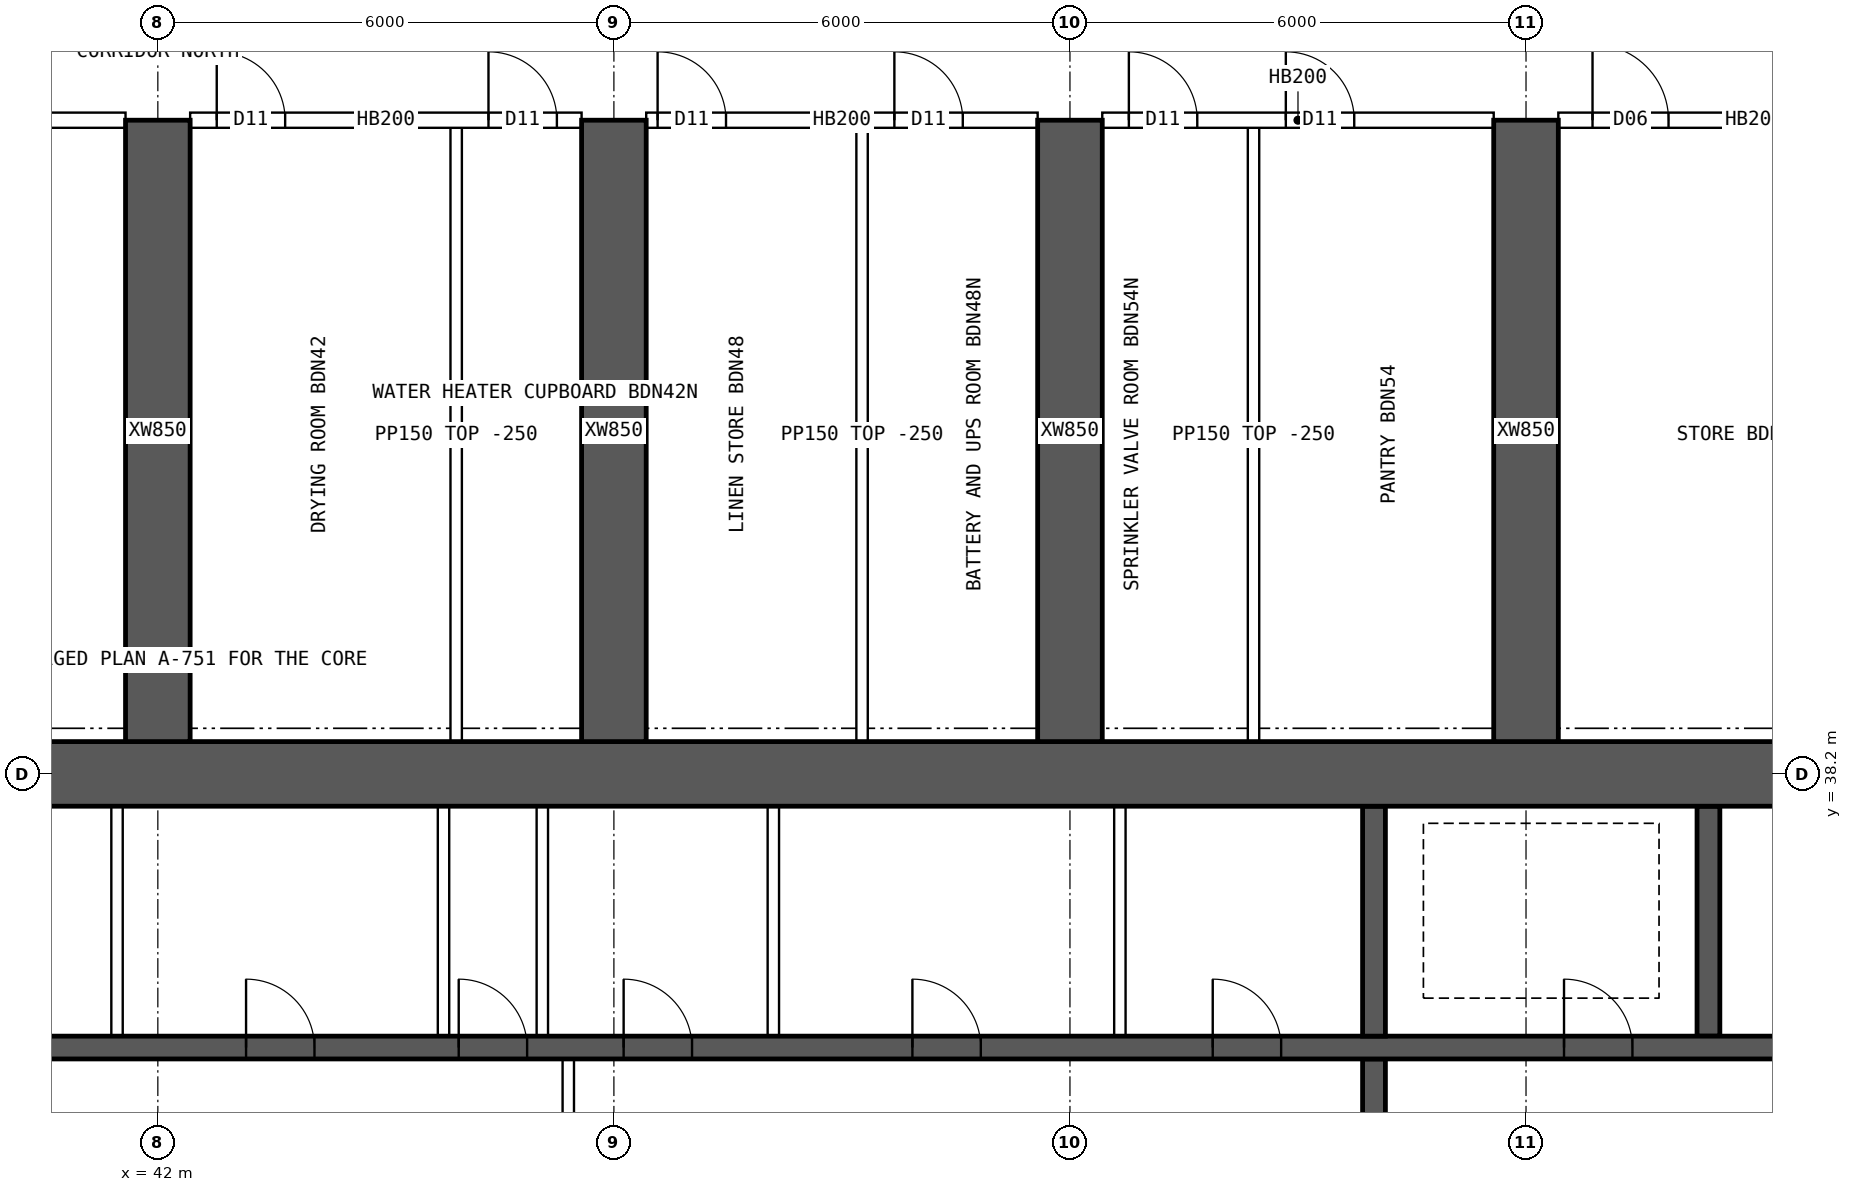
"""IFC4 building model, lengths in metres.
Left out: names, types, materials, properties, quantities, classifications, styles, units other than length and angle.
Written with IfcOpenShell. Run it as: python <this file> out.ifc"""

import sys

from ifc_helpers import new_model, si_unit, direction, frame, frame_2d, origin, place, context, subcontext, project, spatial, rectangle, extrude, element, fill, save


model = new_model("IFC4")
c1 = context("Model", 3, precision=1e-05, world=origin(), true_north=direction((0.0, 1.0)))
c2 = subcontext(c1, "Body", "Model", "MODEL_VIEW")
j1 = project(units=[si_unit("LENGTHUNIT", "METRE"), si_unit("PLANEANGLEUNIT", "RADIAN")], contexts=[c1])
p1 = place(None, origin())
s1 = spatial("IfcSite", under=j1, at=p1, CompositionType="ELEMENT")
p2 = place(p1, origin())
s2 = spatial("IfcBuilding", under=s1, at=p2, CompositionType="ELEMENT")
p3 = place(p2, frame((0.0, 0.0, 193.6)))
s3 = spatial("IfcBuildingStorey", under=s2, at=p3, CompositionType="ELEMENT", Elevation=193.6)
p4 = place(p3, frame((18.0, 38.2, 0.0), z_axis=(0.0, 0.0, 1.0), x_axis=(1.0, 0.0, 0.0)))
e1 = element("IfcWall", 1, at=p4, inside=s3, PredefinedType="SHEAR", context=c2, shape_type="SweptSolid", body=[
    extrude(rectangle(XDim=48.0, YDim=0.85, at=frame_2d((24.0, 0.0))), origin(), (0.0, 0.0, 1.0), 3.75),
])
p5 = place(p3, frame((18.425, 34.6, 0.0), z_axis=(0.0, 0.0, 1.0), x_axis=(1.0, 0.0, 0.0)))
e2 = element("IfcWall", 2, at=p5, inside=s3, PredefinedType="SHEAR", context=c2, shape_type="SweptSolid", body=[
    extrude(rectangle(XDim=47.15, YDim=0.3, at=frame_2d((23.575, 0.0))), origin(), (0.0, 0.0, 1.0), 3.75),
])
p6 = place(p5, frame((0.9, 0.0, 0.0)))
e3 = element("IfcOpeningElement", 3, at=p6, cuts=e2, PredefinedType="OPENING", context=c2, shape_type="SweptSolid", body=[
    extrude(rectangle(XDim=1.1, YDim=2.1, at=frame_2d((0.55, 1.05))), frame((0.0, 0.16, 0.0), z_axis=(0.0, -1.0, 0.0), x_axis=(1.0, 0.0, 0.0)), (0.0, 0.0, 1.0), 0.32),
])
p7 = place(p5, frame((45.15, 0.0, 0.0)))
e4 = element("IfcOpeningElement", 4, at=p7, cuts=e2, PredefinedType="OPENING", context=c2, shape_type="SweptSolid", body=[
    extrude(rectangle(XDim=1.1, YDim=2.1, at=frame_2d((0.55, 1.05))), frame((0.0, 0.16, 0.0), z_axis=(0.0, -1.0, 0.0), x_axis=(1.0, 0.0, 0.0)), (0.0, 0.0, 1.0), 0.32),
])
p8 = place(p5, frame((4.175, 0.0, 0.0)))
e5 = element("IfcOpeningElement", 5, at=p8, cuts=e2, PredefinedType="OPENING", context=c2, shape_type="SweptSolid", body=[
    extrude(rectangle(XDim=0.9, YDim=2.1, at=frame_2d((0.45, 1.05))), frame((0.0, 0.16, 0.0), z_axis=(0.0, -1.0, 0.0), x_axis=(1.0, 0.0, 0.0)), (0.0, 0.0, 1.0), 0.32),
])
p9 = place(p5, frame((42.075, 0.0, 0.0)))
e6 = element("IfcOpeningElement", 6, at=p9, cuts=e2, PredefinedType="OPENING", context=c2, shape_type="SweptSolid", body=[
    extrude(rectangle(XDim=0.9, YDim=2.1, at=frame_2d((0.45, 1.05))), frame((0.0, 0.16, 0.0), z_axis=(0.0, -1.0, 0.0), x_axis=(1.0, 0.0, 0.0)), (0.0, 0.0, 1.0), 0.32),
])
p10 = place(p5, frame((8.95, 0.0, 0.0)))
e7 = element("IfcOpeningElement", 7, at=p10, cuts=e2, PredefinedType="OPENING", context=c2, shape_type="SweptSolid", body=[
    extrude(rectangle(XDim=0.9, YDim=2.1, at=frame_2d((0.45, 1.05))), frame((0.0, 0.16, 0.0), z_axis=(0.0, -1.0, 0.0), x_axis=(1.0, 0.0, 0.0)), (0.0, 0.0, 1.0), 0.32),
])
p11 = place(p5, frame((12.924, 0.0, 0.0)))
e8 = element("IfcOpeningElement", 8, at=p11, cuts=e2, PredefinedType="OPENING", context=c2, shape_type="SweptSolid", body=[
    extrude(rectangle(XDim=0.9, YDim=2.1, at=frame_2d((0.45, 1.05))), frame((0.0, 0.16, 0.0), z_axis=(0.0, -1.0, 0.0), x_axis=(1.0, 0.0, 0.0)), (0.0, 0.0, 1.0), 0.32),
])
p12 = place(p5, frame((16.571, 0.0, 0.0)))
e9 = element("IfcOpeningElement", 9, at=p12, cuts=e2, PredefinedType="OPENING", context=c2, shape_type="SweptSolid", body=[
    extrude(rectangle(XDim=0.9, YDim=2.1, at=frame_2d((0.45, 1.05))), frame((0.0, 0.16, 0.0), z_axis=(0.0, -1.0, 0.0), x_axis=(1.0, 0.0, 0.0)), (0.0, 0.0, 1.0), 0.32),
])
p13 = place(p5, frame((20.33, 0.0, 0.0)))
e10 = element("IfcOpeningElement", 10, at=p13, cuts=e2, PredefinedType="OPENING", context=c2, shape_type="SweptSolid", body=[
    extrude(rectangle(XDim=0.9, YDim=2.1, at=frame_2d((0.45, 1.05))), frame((0.0, 0.16, 0.0), z_axis=(0.0, -1.0, 0.0), x_axis=(1.0, 0.0, 0.0)), (0.0, 0.0, 1.0), 0.32),
])
p14 = place(p5, frame((24.736, 0.0, 0.0)))
e11 = element("IfcOpeningElement", 11, at=p14, cuts=e2, PredefinedType="OPENING", context=c2, shape_type="SweptSolid", body=[
    extrude(rectangle(XDim=0.9, YDim=2.1, at=frame_2d((0.45, 1.05))), frame((0.0, 0.16, 0.0), z_axis=(0.0, -1.0, 0.0), x_axis=(1.0, 0.0, 0.0)), (0.0, 0.0, 1.0), 0.32),
])
p15 = place(p5, frame((27.533, 0.0, 0.0)))
e12 = element("IfcOpeningElement", 12, at=p15, cuts=e2, PredefinedType="OPENING", context=c2, shape_type="SweptSolid", body=[
    extrude(rectangle(XDim=0.9, YDim=2.1, at=frame_2d((0.45, 1.05))), frame((0.0, 0.16, 0.0), z_axis=(0.0, -1.0, 0.0), x_axis=(1.0, 0.0, 0.0)), (0.0, 0.0, 1.0), 0.32),
])
p16 = place(p5, frame((29.703, 0.0, 0.0)))
e13 = element("IfcOpeningElement", 13, at=p16, cuts=e2, PredefinedType="OPENING", context=c2, shape_type="SweptSolid", body=[
    extrude(rectangle(XDim=0.9, YDim=2.1, at=frame_2d((0.45, 1.05))), frame((0.0, 0.16, 0.0), z_axis=(0.0, -1.0, 0.0), x_axis=(1.0, 0.0, 0.0)), (0.0, 0.0, 1.0), 0.32),
])
p17 = place(p5, frame((33.502, 0.0, 0.0)))
e14 = element("IfcOpeningElement", 14, at=p17, cuts=e2, PredefinedType="OPENING", context=c2, shape_type="SweptSolid", body=[
    extrude(rectangle(XDim=0.9, YDim=2.1, at=frame_2d((0.45, 1.05))), frame((0.0, 0.16, 0.0), z_axis=(0.0, -1.0, 0.0), x_axis=(1.0, 0.0, 0.0)), (0.0, 0.0, 1.0), 0.32),
])
p18 = place(p5, frame((37.453, 0.0, 0.0)))
e15 = element("IfcOpeningElement", 15, at=p18, cuts=e2, PredefinedType="OPENING", context=c2, shape_type="SweptSolid", body=[
    extrude(rectangle(XDim=0.9, YDim=2.1, at=frame_2d((0.45, 1.05))), frame((0.0, 0.16, 0.0), z_axis=(0.0, -1.0, 0.0), x_axis=(1.0, 0.0, 0.0)), (0.0, 0.0, 1.0), 0.32),
])
p19 = place(p3, frame((58.0, 30.55, 0.0), z_axis=(0.0, 0.0, 1.0), x_axis=(0.0, 1.0, 0.0)))
e16 = element("IfcWall", 16, at=p19, inside=s3, PredefinedType="SHEAR", context=c2, shape_type="SweptSolid", body=[
    extrude(rectangle(XDim=3.9, YDim=0.3, at=frame_2d((1.95, 0.0))), origin(), (0.0, 0.0, 1.0), 3.75),
])
p20 = place(p19, frame((1.4, 0.0, 0.0)))
e17 = element("IfcOpeningElement", 17, at=p20, cuts=e16, PredefinedType="OPENING", context=c2, shape_type="SweptSolid", body=[
    extrude(rectangle(XDim=1.2, YDim=2.1, at=frame_2d((0.6, 1.05))), frame((0.0, 0.16, 0.0), z_axis=(0.0, -1.0, 0.0), x_axis=(1.0, 0.0, 0.0)), (0.0, 0.0, 1.0), 0.32),
])
for number, where, z_axis, x_axis in (
    (18, (62.4, 34.75, 0.0), (0.0, 0.0, 1.0), (0.0, 1.0, 0.0)),
    (19, (58.0, 34.75, 0.0), (0.0, 0.0, 1.0), (0.0, 1.0, 0.0)),
):
    element("IfcWall", number, at=place(p3, frame(where, z_axis=z_axis, x_axis=x_axis)), inside=s3, PredefinedType="SHEAR", context=c2, shape_type="SweptSolid", body=[
        extrude(rectangle(XDim=3.025, YDim=0.3, at=frame_2d((1.512, 0.0))), origin(), (0.0, 0.0, 1.0), 3.75),
    ])
for number, where, z_axis, x_axis in (
    (20, (42.0, 38.625, 0.0), (0.0, 0.0, 1.0), (0.0, 1.0, 0.0)),
    (21, (48.0, 38.625, 0.0), (0.0, 0.0, 1.0), (0.0, 1.0, 0.0)),
    (22, (54.0, 38.625, 0.0), (0.0, 0.0, 1.0), (0.0, 1.0, 0.0)),
    (23, (60.0, 38.625, 0.0), (0.0, 0.0, 1.0), (0.0, 1.0, 0.0)),
):
    element("IfcWall", number, at=place(p3, frame(where, z_axis=z_axis, x_axis=x_axis)), inside=s3, PredefinedType="SHEAR", context=c2, shape_type="SweptSolid", body=[
        extrude(rectangle(XDim=8.175, YDim=0.85, at=frame_2d((4.087, 0.0))), origin(), (0.0, 0.0, 1.0), 3.75),
    ])
p21 = place(p3, frame((47.4, 30.55, 0.0), z_axis=(0.0, 0.0, 1.0), x_axis=(0.0, 1.0, 0.0)))
e24 = element("IfcWall", 24, at=p21, inside=s3, PredefinedType="SOLIDWALL", context=c2, shape_type="SweptSolid", body=[
    extrude(rectangle(XDim=3.9, YDim=0.15, at=frame_2d((1.95, 0.0))), origin(), (0.0, 0.0, 1.0), 3.5),
])
p22 = place(p21, frame((1.15, 0.0, 0.0)))
e25 = element("IfcOpeningElement", 25, at=p22, cuts=e24, PredefinedType="OPENING", context=c2, shape_type="SweptSolid", body=[
    extrude(rectangle(XDim=1.6, YDim=2.1, at=frame_2d((0.8, 1.05))), frame((0.0, 0.085, 0.0), z_axis=(0.0, -1.0, 0.0), x_axis=(1.0, 0.0, 0.0)), (0.0, 0.0, 1.0), 0.17),
])
for number, where, z_axis, x_axis in (
    (26, (41.463, 34.75, 0.0), (0.0, 0.0, 1.0), (0.0, 1.0, 0.0)),
    (27, (45.758, 34.75, 0.0), (0.0, 0.0, 1.0), (0.0, 1.0, 0.0)),
    (28, (47.058, 34.75, 0.0), (0.0, 0.0, 1.0), (0.0, 1.0, 0.0)),
    (29, (50.098, 34.75, 0.0), (0.0, 0.0, 1.0), (0.0, 1.0, 0.0)),
    (30, (54.657, 34.75, 0.0), (0.0, 0.0, 1.0), (0.0, 1.0, 0.0)),
):
    element("IfcWall", number, at=place(p3, frame(where, z_axis=z_axis, x_axis=x_axis)), inside=s3, PredefinedType="SOLIDWALL", context=c2, shape_type="SweptSolid", body=[
        extrude(rectangle(XDim=3.025, YDim=0.15, at=frame_2d((1.512, 0.0))), origin(), (0.0, 0.0, 1.0), 3.5),
    ])
p23 = place(p3, frame((36.425, 46.8, 0.0), z_axis=(0.0, 0.0, 1.0), x_axis=(1.0, 0.0, 0.0)))
e31 = element("IfcWall", 31, at=p23, inside=s3, PredefinedType="SOLIDWALL", context=c2, shape_type="SweptSolid", body=[
    extrude(rectangle(XDim=5.15, YDim=0.2, at=frame_2d((2.575, 0.0))), origin(), (0.0, 0.0, 1.0), 3.5),
])
p24 = place(p23, frame((0.15, 0.0, 0.0)))
e32 = element("IfcOpeningElement", 32, at=p24, cuts=e31, PredefinedType="OPENING", context=c2, shape_type="SweptSolid", body=[
    extrude(rectangle(XDim=0.9, YDim=2.1, at=frame_2d((0.45, 1.05))), frame((0.0, 0.11, 0.0), z_axis=(0.0, -1.0, 0.0), x_axis=(1.0, 0.0, 0.0)), (0.0, 0.0, 1.0), 0.22),
])
p25 = place(p23, frame((2.395, 0.0, 0.0)))
e33 = element("IfcOpeningElement", 33, at=p25, cuts=e31, PredefinedType="OPENING", context=c2, shape_type="SweptSolid", body=[
    extrude(rectangle(XDim=0.9, YDim=2.1, at=frame_2d((0.45, 1.05))), frame((0.0, 0.11, 0.0), z_axis=(0.0, -1.0, 0.0), x_axis=(1.0, 0.0, 0.0)), (0.0, 0.0, 1.0), 0.22),
])
p26 = place(p3, frame((42.425, 46.8, 0.0), z_axis=(0.0, 0.0, 1.0), x_axis=(1.0, 0.0, 0.0)))
e34 = element("IfcWall", 34, at=p26, inside=s3, PredefinedType="SOLIDWALL", context=c2, shape_type="SweptSolid", body=[
    extrude(rectangle(XDim=5.15, YDim=0.2, at=frame_2d((2.575, 0.0))), origin(), (0.0, 0.0, 1.0), 3.5),
])
p27 = place(p26, frame((0.35, 0.0, 0.0)))
e35 = element("IfcOpeningElement", 35, at=p27, cuts=e34, PredefinedType="OPENING", context=c2, shape_type="SweptSolid", body=[
    extrude(rectangle(XDim=0.9, YDim=2.1, at=frame_2d((0.45, 1.05))), frame((0.0, 0.11, 0.0), z_axis=(0.0, -1.0, 0.0), x_axis=(1.0, 0.0, 0.0)), (0.0, 0.0, 1.0), 0.22),
])
p28 = place(p26, frame((3.925, 0.0, 0.0)))
e36 = element("IfcOpeningElement", 36, at=p28, cuts=e34, PredefinedType="OPENING", context=c2, shape_type="SweptSolid", body=[
    extrude(rectangle(XDim=0.9, YDim=2.1, at=frame_2d((0.45, 1.05))), frame((0.0, 0.11, 0.0), z_axis=(0.0, -1.0, 0.0), x_axis=(1.0, 0.0, 0.0)), (0.0, 0.0, 1.0), 0.22),
])
p29 = place(p3, frame((48.425, 46.8, 0.0), z_axis=(0.0, 0.0, 1.0), x_axis=(1.0, 0.0, 0.0)))
e37 = element("IfcWall", 37, at=p29, inside=s3, PredefinedType="SOLIDWALL", context=c2, shape_type="SweptSolid", body=[
    extrude(rectangle(XDim=5.15, YDim=0.2, at=frame_2d((2.575, 0.0))), origin(), (0.0, 0.0, 1.0), 3.5),
])
p30 = place(p29, frame((0.15, 0.0, 0.0)))
e38 = element("IfcOpeningElement", 38, at=p30, cuts=e37, PredefinedType="OPENING", context=c2, shape_type="SweptSolid", body=[
    extrude(rectangle(XDim=0.9, YDim=2.1, at=frame_2d((0.45, 1.05))), frame((0.0, 0.11, 0.0), z_axis=(0.0, -1.0, 0.0), x_axis=(1.0, 0.0, 0.0)), (0.0, 0.0, 1.0), 0.22),
])
p31 = place(p29, frame((3.265, 0.0, 0.0)))
e39 = element("IfcOpeningElement", 39, at=p31, cuts=e37, PredefinedType="OPENING", context=c2, shape_type="SweptSolid", body=[
    extrude(rectangle(XDim=0.9, YDim=2.1, at=frame_2d((0.45, 1.05))), frame((0.0, 0.11, 0.0), z_axis=(0.0, -1.0, 0.0), x_axis=(1.0, 0.0, 0.0)), (0.0, 0.0, 1.0), 0.22),
])
p32 = place(p3, frame((54.425, 46.8, 0.0), z_axis=(0.0, 0.0, 1.0), x_axis=(1.0, 0.0, 0.0)))
e40 = element("IfcWall", 40, at=p32, inside=s3, PredefinedType="SOLIDWALL", context=c2, shape_type="SweptSolid", body=[
    extrude(rectangle(XDim=5.15, YDim=0.2, at=frame_2d((2.575, 0.0))), origin(), (0.0, 0.0, 1.0), 3.5),
])
p33 = place(p32, frame((0.35, 0.0, 0.0)))
e41 = element("IfcOpeningElement", 41, at=p33, cuts=e40, PredefinedType="OPENING", context=c2, shape_type="SweptSolid", body=[
    extrude(rectangle(XDim=0.9, YDim=2.1, at=frame_2d((0.45, 1.05))), frame((0.0, 0.11, 0.0), z_axis=(0.0, -1.0, 0.0), x_axis=(1.0, 0.0, 0.0)), (0.0, 0.0, 1.0), 0.22),
])
p34 = place(p32, frame((2.415, 0.0, 0.0)))
e42 = element("IfcOpeningElement", 42, at=p34, cuts=e40, PredefinedType="OPENING", context=c2, shape_type="SweptSolid", body=[
    extrude(rectangle(XDim=0.9, YDim=2.1, at=frame_2d((0.45, 1.05))), frame((0.0, 0.11, 0.0), z_axis=(0.0, -1.0, 0.0), x_axis=(1.0, 0.0, 0.0)), (0.0, 0.0, 1.0), 0.22),
])
p35 = place(p3, frame((60.425, 46.8, 0.0), z_axis=(0.0, 0.0, 1.0), x_axis=(1.0, 0.0, 0.0)))
e43 = element("IfcWall", 43, at=p35, inside=s3, PredefinedType="SOLIDWALL", context=c2, shape_type="SweptSolid", body=[
    extrude(rectangle(XDim=5.15, YDim=0.2, at=frame_2d((2.575, 0.0))), origin(), (0.0, 0.0, 1.0), 3.5),
])
p36 = place(p35, frame((0.45, 0.0, 0.0)))
e44 = element("IfcOpeningElement", 44, at=p36, cuts=e43, PredefinedType="OPENING", context=c2, shape_type="SweptSolid", body=[
    extrude(rectangle(XDim=1.0, YDim=2.1, at=frame_2d((0.5, 1.05))), frame((0.0, 0.11, 0.0), z_axis=(0.0, -1.0, 0.0), x_axis=(1.0, 0.0, 0.0)), (0.0, 0.0, 1.0), 0.22),
])
for number, where, z_axis, x_axis in (
    (45, (45.925, 38.625, 0.0), (0.0, 0.0, 1.0), (0.0, 1.0, 0.0)),
    (46, (51.265, 38.625, 0.0), (0.0, 0.0, 1.0), (0.0, 1.0, 0.0)),
    (47, (56.415, 38.625, 0.0), (0.0, 0.0, 1.0), (0.0, 1.0, 0.0)),
):
    element("IfcWall", number, at=place(p3, frame(where, z_axis=z_axis, x_axis=x_axis)), inside=s3, PredefinedType="PARTITIONING", context=c2, shape_type="SweptSolid", body=[
        extrude(rectangle(XDim=8.075, YDim=0.15, at=frame_2d((4.038, 0.0))), origin(), (0.0, 0.0, 1.0), 3.5),
    ])
p37 = place(p9, origin())
e48 = element("IfcDoor", 48, at=p37, inside=s3, OperationType="SINGLE_SWING_LEFT", PredefinedType="DOOR", context=c2, shape_type="SweptSolid", body=[
    extrude(rectangle(XDim=0.9, YDim=2.1, at=frame_2d((0.45, 1.05))), frame((0.0, 0.025, 0.0), z_axis=(0.0, -1.0, 0.0), x_axis=(1.0, 0.0, 0.0)), (0.0, 0.0, 1.0), 0.05),
])
fill(e6, e48)
p38 = place(p14, origin())
e49 = element("IfcDoor", 49, at=p38, inside=s3, OperationType="SINGLE_SWING_LEFT", PredefinedType="DOOR", context=c2, shape_type="SweptSolid", body=[
    extrude(rectangle(XDim=0.9, YDim=2.1, at=frame_2d((0.45, 1.05))), frame((0.0, 0.025, 0.0), z_axis=(0.0, -1.0, 0.0), x_axis=(1.0, 0.0, 0.0)), (0.0, 0.0, 1.0), 0.05),
])
fill(e11, e49)
p39 = place(p15, origin())
e50 = element("IfcDoor", 50, at=p39, inside=s3, OperationType="SINGLE_SWING_LEFT", PredefinedType="DOOR", context=c2, shape_type="SweptSolid", body=[
    extrude(rectangle(XDim=0.9, YDim=2.1, at=frame_2d((0.45, 1.05))), frame((0.0, 0.025, 0.0), z_axis=(0.0, -1.0, 0.0), x_axis=(1.0, 0.0, 0.0)), (0.0, 0.0, 1.0), 0.05),
])
fill(e12, e50)
p40 = place(p16, origin())
e51 = element("IfcDoor", 51, at=p40, inside=s3, OperationType="SINGLE_SWING_LEFT", PredefinedType="DOOR", context=c2, shape_type="SweptSolid", body=[
    extrude(rectangle(XDim=0.9, YDim=2.1, at=frame_2d((0.45, 1.05))), frame((0.0, 0.025, 0.0), z_axis=(0.0, -1.0, 0.0), x_axis=(1.0, 0.0, 0.0)), (0.0, 0.0, 1.0), 0.05),
])
fill(e13, e51)
p41 = place(p17, origin())
e52 = element("IfcDoor", 52, at=p41, inside=s3, OperationType="SINGLE_SWING_LEFT", PredefinedType="DOOR", context=c2, shape_type="SweptSolid", body=[
    extrude(rectangle(XDim=0.9, YDim=2.1, at=frame_2d((0.45, 1.05))), frame((0.0, 0.025, 0.0), z_axis=(0.0, -1.0, 0.0), x_axis=(1.0, 0.0, 0.0)), (0.0, 0.0, 1.0), 0.05),
])
fill(e14, e52)
p42 = place(p18, origin())
e53 = element("IfcDoor", 53, at=p42, inside=s3, OperationType="SINGLE_SWING_LEFT", PredefinedType="DOOR", context=c2, shape_type="SweptSolid", body=[
    extrude(rectangle(XDim=0.9, YDim=2.1, at=frame_2d((0.45, 1.05))), frame((0.0, 0.025, 0.0), z_axis=(0.0, -1.0, 0.0), x_axis=(1.0, 0.0, 0.0)), (0.0, 0.0, 1.0), 0.05),
])
fill(e15, e53)
p43 = place(p27, origin())
e54 = element("IfcDoor", 54, at=p43, inside=s3, OperationType="SINGLE_SWING_LEFT", PredefinedType="DOOR", context=c2, shape_type="SweptSolid", body=[
    extrude(rectangle(XDim=0.9, YDim=2.1, at=frame_2d((0.45, 1.05))), frame((0.0, 0.025, 0.0), z_axis=(0.0, -1.0, 0.0), x_axis=(1.0, 0.0, 0.0)), (0.0, 0.0, 1.0), 0.05),
])
fill(e35, e54)
p44 = place(p28, origin())
e55 = element("IfcDoor", 55, at=p44, inside=s3, OperationType="SINGLE_SWING_LEFT", PredefinedType="DOOR", context=c2, shape_type="SweptSolid", body=[
    extrude(rectangle(XDim=0.9, YDim=2.1, at=frame_2d((0.45, 1.05))), frame((0.0, 0.025, 0.0), z_axis=(0.0, -1.0, 0.0), x_axis=(1.0, 0.0, 0.0)), (0.0, 0.0, 1.0), 0.05),
])
fill(e36, e55)
p45 = place(p30, origin())
e56 = element("IfcDoor", 56, at=p45, inside=s3, OperationType="SINGLE_SWING_LEFT", PredefinedType="DOOR", context=c2, shape_type="SweptSolid", body=[
    extrude(rectangle(XDim=0.9, YDim=2.1, at=frame_2d((0.45, 1.05))), frame((0.0, 0.025, 0.0), z_axis=(0.0, -1.0, 0.0), x_axis=(1.0, 0.0, 0.0)), (0.0, 0.0, 1.0), 0.05),
])
fill(e38, e56)
p46 = place(p31, origin())
e57 = element("IfcDoor", 57, at=p46, inside=s3, OperationType="SINGLE_SWING_LEFT", PredefinedType="DOOR", context=c2, shape_type="SweptSolid", body=[
    extrude(rectangle(XDim=0.9, YDim=2.1, at=frame_2d((0.45, 1.05))), frame((0.0, 0.025, 0.0), z_axis=(0.0, -1.0, 0.0), x_axis=(1.0, 0.0, 0.0)), (0.0, 0.0, 1.0), 0.05),
])
fill(e39, e57)
p47 = place(p33, origin())
e58 = element("IfcDoor", 58, at=p47, inside=s3, OperationType="SINGLE_SWING_LEFT", PredefinedType="DOOR", context=c2, shape_type="SweptSolid", body=[
    extrude(rectangle(XDim=0.9, YDim=2.1, at=frame_2d((0.45, 1.05))), frame((0.0, 0.025, 0.0), z_axis=(0.0, -1.0, 0.0), x_axis=(1.0, 0.0, 0.0)), (0.0, 0.0, 1.0), 0.05),
])
fill(e41, e58)
p48 = place(p34, origin())
e59 = element("IfcDoor", 59, at=p48, inside=s3, OperationType="SINGLE_SWING_LEFT", PredefinedType="DOOR", context=c2, shape_type="SweptSolid", body=[
    extrude(rectangle(XDim=0.9, YDim=2.1, at=frame_2d((0.45, 1.05))), frame((0.0, 0.025, 0.0), z_axis=(0.0, -1.0, 0.0), x_axis=(1.0, 0.0, 0.0)), (0.0, 0.0, 1.0), 0.05),
])
fill(e42, e59)
p49 = place(p36, origin())
e60 = element("IfcDoor", 60, at=p49, inside=s3, OperationType="SINGLE_SWING_LEFT", PredefinedType="DOOR", context=c2, shape_type="SweptSolid", body=[
    extrude(rectangle(XDim=1.0, YDim=2.1, at=frame_2d((0.5, 1.05))), frame((0.0, 0.025, 0.0), z_axis=(0.0, -1.0, 0.0), x_axis=(1.0, 0.0, 0.0)), (0.0, 0.0, 1.0), 0.05),
])
fill(e44, e60)
save(model, sys.argv[1])
